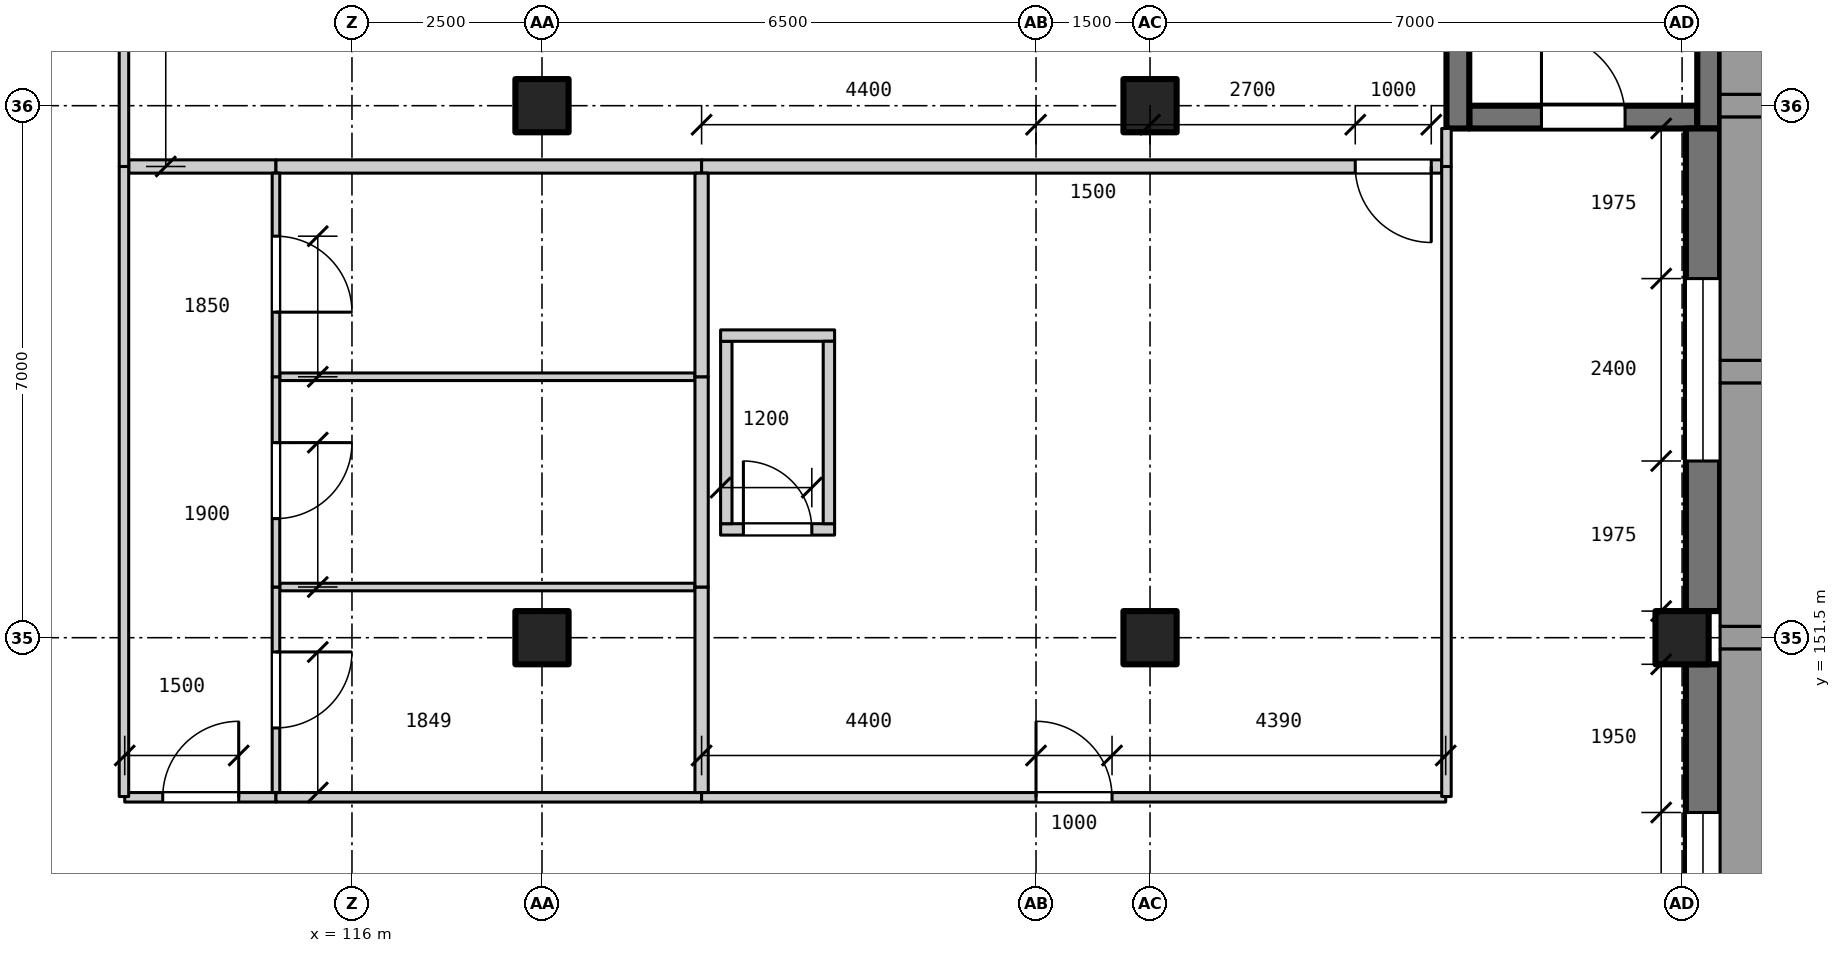
"""IFC4 building model, lengths in metres.
Left out: names, types, materials, properties, quantities, classifications, styles, units other than length and angle.
Written with IfcOpenShell. Run it as: python <this file> out.ifc"""

import sys

from ifc_helpers import new_model, si_unit, direction, frame, frame_2d, origin, origin_2d, place, context, subcontext, project, spatial, rectangle, extrude, element, fill, save


model = new_model("IFC4")
c1 = context("Model", 3, precision=1e-05, world=origin(), true_north=direction((0.0, 1.0)))
c2 = subcontext(c1, "Body", "Model", "MODEL_VIEW")
j1 = project(units=[si_unit("LENGTHUNIT", "METRE"), si_unit("PLANEANGLEUNIT", "RADIAN")], contexts=[c1])
p1 = place(None, origin())
s1 = spatial("IfcSite", under=j1, at=p1, CompositionType="ELEMENT")
p2 = place(p1, origin())
s2 = spatial("IfcBuilding", under=s1, at=p2, CompositionType="ELEMENT")
p3 = place(p2, frame((0.0, 0.0, 6.0)))
s3 = spatial("IfcBuildingStorey", under=s2, at=p3, CompositionType="ELEMENT", Elevation=6.0)
for number, where, z_axis, x_axis in (
    (1, (118.5, 151.5, 0.0), (0.0, 0.0, 1.0), (1.0, 0.0, 0.0)),
    (2, (118.5, 158.5, 0.0), (0.0, 0.0, 1.0), (1.0, 0.0, 0.0)),
    (3, (126.5, 151.5, 0.0), (0.0, 0.0, 1.0), (1.0, 0.0, 0.0)),
    (4, (126.5, 158.5, 0.0), (0.0, 0.0, 1.0), (1.0, 0.0, 0.0)),
    (5, (133.5, 151.5, 0.0), (0.0, 0.0, 1.0), (1.0, 0.0, 0.0)),
):
    element("IfcColumn", number, at=place(p3, frame(where, z_axis=z_axis, x_axis=x_axis)), inside=s3, PredefinedType="COLUMN", context=c2, shape_type="SweptSolid", body=[
        extrude(rectangle(XDim=0.7, YDim=0.7, at=origin_2d()), origin(), (0.0, 0.0, 1.0), 4.2),
    ])
p4 = place(p3, frame((130.7, 158.35, 0.0), z_axis=(0.0, 0.0, 1.0), x_axis=(1.0, 0.0, 0.0)))
e6 = element("IfcWall", 6, at=p4, inside=s3, PredefinedType="SHEAR", context=c2, shape_type="SweptSolid", body=[
    extrude(rectangle(XDim=3.0, YDim=0.3, at=frame_2d((1.5, 0.0))), origin(), (0.0, 0.0, 1.0), 4.2),
])
p5 = place(p4, frame((0.95, 0.0, 0.0)))
e7 = element("IfcOpeningElement", 7, at=p5, cuts=e6, PredefinedType="OPENING", context=c2, shape_type="SweptSolid", body=[
    extrude(rectangle(XDim=1.1, YDim=2.1, at=frame_2d((0.55, 1.05))), frame((0.0, 0.16, 0.0), z_axis=(0.0, -1.0, 0.0), x_axis=(1.0, 0.0, 0.0)), (0.0, 0.0, 1.0), 0.32),
])
p6 = place(p3, frame((130.55, 158.2, 0.0), z_axis=(0.0, 0.0, 1.0), x_axis=(0.0, 1.0, 0.0)))
e8 = element("IfcWall", 8, at=p6, inside=s3, PredefinedType="SHEAR", context=c2, shape_type="SweptSolid", body=[
    extrude(rectangle(XDim=7.5, YDim=0.3, at=frame_2d((3.75, 0.0))), origin(), (0.0, 0.0, 1.0), 4.2),
])
p7 = place(p3, frame((133.85, 165.7, 0.0), z_axis=(0.0, 0.0, 1.0), x_axis=(0.0, -1.0, 0.0)))
e9 = element("IfcWall", 9, at=p7, inside=s3, PredefinedType="SOLIDWALL", context=c2, shape_type="SweptSolid", body=[
    extrude(rectangle(XDim=7.5, YDim=0.3, at=frame_2d((3.75, 0.0))), origin(), (0.0, 0.0, 1.0), 3.9),
])
p8 = place(p3, frame((133.775, 151.15, 0.0), z_axis=(0.0, 0.0, 1.0), x_axis=(0.0, -1.0, 0.0)))
e10 = element("IfcWall", 10, at=p8, inside=s3, PredefinedType="SOLIDWALL", context=c2, shape_type="SweptSolid", body=[
    extrude(rectangle(XDim=6.3, YDim=0.45, at=frame_2d((3.15, 0.0))), origin(), (0.0, 0.0, 1.0), 3.2),
])
p9 = place(p8, frame((1.95, 0.0, 0.9)))
e11 = element("IfcOpeningElement", 11, at=p9, cuts=e10, PredefinedType="OPENING", context=c2, shape_type="SweptSolid", body=[
    extrude(rectangle(XDim=2.4, YDim=1.6, at=frame_2d((1.2, 0.8))), frame((0.0, 0.235, 0.0), z_axis=(0.0, -1.0, 0.0), x_axis=(1.0, 0.0, 0.0)), (0.0, 0.0, 1.0), 0.47),
])
p10 = place(p3, frame((133.775, 158.2, 0.0), z_axis=(0.0, 0.0, 1.0), x_axis=(0.0, -1.0, 0.0)))
e12 = element("IfcWall", 12, at=p10, inside=s3, PredefinedType="SOLIDWALL", context=c2, shape_type="SweptSolid", body=[
    extrude(rectangle(XDim=6.35, YDim=0.45, at=frame_2d((3.175, 0.0))), origin(), (0.0, 0.0, 1.0), 3.2),
])
p11 = place(p10, frame((1.975, 0.0, 0.9)))
e13 = element("IfcOpeningElement", 13, at=p11, cuts=e12, PredefinedType="OPENING", context=c2, shape_type="SweptSolid", body=[
    extrude(rectangle(XDim=2.4, YDim=1.6, at=frame_2d((1.2, 0.8))), frame((0.0, 0.235, 0.0), z_axis=(0.0, -1.0, 0.0), x_axis=(1.0, 0.0, 0.0)), (0.0, 0.0, 1.0), 0.47),
])
p12 = place(p3, frame((120.85, 152.925, 0.0), z_axis=(0.0, 0.0, 1.0), x_axis=(1.0, 0.0, 0.0)))
e14 = element("IfcWall", 14, at=p12, inside=s3, PredefinedType="PARTITIONING", context=c2, shape_type="SweptSolid", body=[
    extrude(rectangle(XDim=1.5, YDim=0.15, at=frame_2d((0.75, 0.0))), origin(), (0.0, 0.0, 1.0), 3.9),
])
p13 = place(p12, frame((0.3, 0.0, 0.0)))
e15 = element("IfcOpeningElement", 15, at=p13, cuts=e14, PredefinedType="OPENING", context=c2, shape_type="SweptSolid", body=[
    extrude(rectangle(XDim=0.9, YDim=2.1, at=frame_2d((0.45, 1.05))), frame((0.0, 0.085, 0.0), z_axis=(0.0, -1.0, 0.0), x_axis=(1.0, 0.0, 0.0)), (0.0, 0.0, 1.0), 0.17),
])
p14 = place(p3, frame((120.925, 153.0, 0.0), z_axis=(0.0, 0.0, 1.0), x_axis=(0.0, 1.0, 0.0)))
e16 = element("IfcWall", 16, at=p14, inside=s3, PredefinedType="PARTITIONING", context=c2, shape_type="SweptSolid", body=[
    extrude(rectangle(XDim=2.4, YDim=0.15, at=frame_2d((1.2, 0.0))), origin(), (0.0, 0.0, 1.0), 3.9),
])
p15 = place(p3, frame((120.85, 155.475, 0.0), z_axis=(0.0, 0.0, 1.0), x_axis=(1.0, 0.0, 0.0)))
e17 = element("IfcWall", 17, at=p15, inside=s3, PredefinedType="PARTITIONING", context=c2, shape_type="SweptSolid", body=[
    extrude(rectangle(XDim=1.5, YDim=0.15, at=frame_2d((0.75, 0.0))), origin(), (0.0, 0.0, 1.0), 3.9),
])
p16 = place(p3, frame((122.275, 153.0, 0.0), z_axis=(0.0, 0.0, 1.0), x_axis=(0.0, 1.0, 0.0)))
e18 = element("IfcWall", 18, at=p16, inside=s3, PredefinedType="PARTITIONING", context=c2, shape_type="SweptSolid", body=[
    extrude(rectangle(XDim=2.4, YDim=0.15, at=frame_2d((1.2, 0.0))), origin(), (0.0, 0.0, 1.0), 3.9),
])
p17 = place(p3, frame((113.01, 149.4, 0.0), z_axis=(0.0, 0.0, 1.0), x_axis=(1.0, 0.0, 0.0)))
e19 = element("IfcWall", 19, at=p17, inside=s3, PredefinedType="PARTITIONING", context=c2, shape_type="SweptSolid", body=[
    extrude(rectangle(XDim=1.99, YDim=0.125, at=frame_2d((0.995, 0.0))), origin(), (0.0, 0.0, 1.0), 3.9),
])
p18 = place(p17, frame((0.5, 0.0, 0.0)))
e20 = element("IfcOpeningElement", 20, at=p18, cuts=e19, PredefinedType="OPENING", context=c2, shape_type="SweptSolid", body=[
    extrude(rectangle(XDim=1.0, YDim=2.1, at=frame_2d((0.5, 1.05))), frame((0.0, 0.073, 0.0), z_axis=(0.0, -1.0, 0.0), x_axis=(1.0, 0.0, 0.0)), (0.0, 0.0, 1.0), 0.145),
])
p19 = place(p3, frame((115.0, 149.4, 0.0), z_axis=(0.0, 0.0, 1.0), x_axis=(1.0, 0.0, 0.0)))
e21 = element("IfcWall", 21, at=p19, inside=s3, PredefinedType="PARTITIONING", context=c2, shape_type="SweptSolid", body=[
    extrude(rectangle(XDim=5.6, YDim=0.125, at=frame_2d((2.8, 0.0))), origin(), (0.0, 0.0, 1.0), 3.9),
])
p20 = place(p3, frame((120.6, 149.4, 0.0), z_axis=(0.0, 0.0, 1.0), x_axis=(1.0, 0.0, 0.0)))
e22 = element("IfcWall", 22, at=p20, inside=s3, PredefinedType="PARTITIONING", context=c2, shape_type="SweptSolid", body=[
    extrude(rectangle(XDim=9.79, YDim=0.125, at=frame_2d((4.895, 0.0))), origin(), (0.0, 0.0, 1.0), 3.9),
])
p21 = place(p20, frame((4.4, 0.0, 0.0)))
e23 = element("IfcOpeningElement", 23, at=p21, cuts=e22, PredefinedType="OPENING", context=c2, shape_type="SweptSolid", body=[
    extrude(rectangle(XDim=1.0, YDim=2.1, at=frame_2d((0.5, 1.05))), frame((0.0, 0.073, 0.0), z_axis=(0.0, -1.0, 0.0), x_axis=(1.0, 0.0, 0.0)), (0.0, 0.0, 1.0), 0.145),
])
for number, where, z_axis, x_axis in (
    (24, (115.05, 152.167, 0.0), (0.0, 0.0, 1.0), (1.0, 0.0, 0.0)),
    (25, (115.05, 154.933, 0.0), (0.0, 0.0, 1.0), (1.0, 0.0, 0.0)),
):
    element("IfcWall", number, at=place(p3, frame(where, z_axis=z_axis, x_axis=x_axis)), inside=s3, PredefinedType="PARTITIONING", context=c2, shape_type="SweptSolid", body=[
        extrude(rectangle(XDim=5.462, YDim=0.1, at=frame_2d((2.731, 0.0))), origin(), (0.0, 0.0, 1.0), 3.9),
    ])
p22 = place(p3, frame((113.062, 157.7, 0.0), z_axis=(0.0, 0.0, 1.0), x_axis=(1.0, 0.0, 0.0)))
e26 = element("IfcWall", 26, at=p22, inside=s3, PredefinedType="PARTITIONING", context=c2, shape_type="SweptSolid", body=[
    extrude(rectangle(XDim=1.938, YDim=0.175, at=frame_2d((0.969, 0.0))), origin(), (0.0, 0.0, 1.0), 3.9),
])
p23 = place(p3, frame((115.0, 157.7, 0.0), z_axis=(0.0, 0.0, 1.0), x_axis=(1.0, 0.0, 0.0)))
e27 = element("IfcWall", 27, at=p23, inside=s3, PredefinedType="PARTITIONING", context=c2, shape_type="SweptSolid", body=[
    extrude(rectangle(XDim=5.6, YDim=0.175, at=frame_2d((2.8, 0.0))), origin(), (0.0, 0.0, 1.0), 3.9),
])
p24 = place(p3, frame((120.6, 157.7, 0.0), z_axis=(0.0, 0.0, 1.0), x_axis=(1.0, 0.0, 0.0)))
e28 = element("IfcWall", 28, at=p24, inside=s3, PredefinedType="PARTITIONING", context=c2, shape_type="SweptSolid", body=[
    extrude(rectangle(XDim=9.737, YDim=0.175, at=frame_2d((4.869, 0.0))), origin(), (0.0, 0.0, 1.0), 3.9),
])
p25 = place(p24, frame((8.6, 0.0, 0.0)))
e29 = element("IfcOpeningElement", 29, at=p25, cuts=e28, PredefinedType="OPENING", context=c2, shape_type="SweptSolid", body=[
    extrude(rectangle(XDim=1.0, YDim=2.1, at=frame_2d((0.5, 1.05))), frame((0.0, 0.097, 0.0), z_axis=(0.0, -1.0, 0.0), x_axis=(1.0, 0.0, 0.0)), (0.0, 0.0, 1.0), 0.195),
])
p26 = place(p3, frame((113.0, 149.41, 0.0), z_axis=(0.0, 0.0, 1.0), x_axis=(0.0, 1.0, 0.0)))
e30 = element("IfcWall", 30, at=p26, inside=s3, PredefinedType="PARTITIONING", context=c2, shape_type="SweptSolid", body=[
    extrude(rectangle(XDim=8.29, YDim=0.125, at=frame_2d((4.145, 0.0))), origin(), (0.0, 0.0, 1.0), 3.9),
])
p27 = place(p3, frame((113.0, 157.7, 0.0), z_axis=(0.0, 0.0, 1.0), x_axis=(0.0, 1.0, 0.0)))
e31 = element("IfcWall", 31, at=p27, inside=s3, PredefinedType="PARTITIONING", context=c2, shape_type="SweptSolid", body=[
    extrude(rectangle(XDim=8.15, YDim=0.125, at=frame_2d((4.075, 0.0))), origin(), (0.0, 0.0, 1.0), 3.9),
])
p28 = place(p27, frame((3.6, 0.0, 0.0)))
e32 = element("IfcOpeningElement", 32, at=p28, cuts=e31, PredefinedType="OPENING", context=c2, shape_type="SweptSolid", body=[
    extrude(rectangle(XDim=1.0, YDim=2.1, at=frame_2d((0.5, 1.05))), frame((0.0, 0.073, 0.0), z_axis=(0.0, -1.0, 0.0), x_axis=(1.0, 0.0, 0.0)), (0.0, 0.0, 1.0), 0.145),
])
p29 = place(p3, frame((115.0, 149.462, 0.0), z_axis=(0.0, 0.0, 1.0), x_axis=(0.0, 1.0, 0.0)))
e33 = element("IfcWall", 33, at=p29, inside=s3, PredefinedType="PARTITIONING", context=c2, shape_type="SweptSolid", body=[
    extrude(rectangle(XDim=2.704, YDim=0.1, at=frame_2d((1.352, 0.0))), origin(), (0.0, 0.0, 1.0), 3.9),
])
p30 = place(p29, frame((0.85, 0.0, 0.0)))
e34 = element("IfcOpeningElement", 34, at=p30, cuts=e33, PredefinedType="OPENING", context=c2, shape_type="SweptSolid", body=[
    extrude(rectangle(XDim=1.0, YDim=2.1, at=frame_2d((0.5, 1.05))), frame((0.0, 0.06, 0.0), z_axis=(0.0, -1.0, 0.0), x_axis=(1.0, 0.0, 0.0)), (0.0, 0.0, 1.0), 0.12),
])
p31 = place(p3, frame((115.0, 152.167, 0.0), z_axis=(0.0, 0.0, 1.0), x_axis=(0.0, 1.0, 0.0)))
e35 = element("IfcWall", 35, at=p31, inside=s3, PredefinedType="PARTITIONING", context=c2, shape_type="SweptSolid", body=[
    extrude(rectangle(XDim=2.767, YDim=0.1, at=frame_2d((1.383, 0.0))), origin(), (0.0, 0.0, 1.0), 3.9),
])
p32 = place(p31, frame((0.9, 0.0, 0.0)))
e36 = element("IfcOpeningElement", 36, at=p32, cuts=e35, PredefinedType="OPENING", context=c2, shape_type="SweptSolid", body=[
    extrude(rectangle(XDim=1.0, YDim=2.1, at=frame_2d((0.5, 1.05))), frame((0.0, 0.06, 0.0), z_axis=(0.0, -1.0, 0.0), x_axis=(1.0, 0.0, 0.0)), (0.0, 0.0, 1.0), 0.12),
])
p33 = place(p3, frame((115.0, 154.933, 0.0), z_axis=(0.0, 0.0, 1.0), x_axis=(0.0, 1.0, 0.0)))
e37 = element("IfcWall", 37, at=p33, inside=s3, PredefinedType="PARTITIONING", context=c2, shape_type="SweptSolid", body=[
    extrude(rectangle(XDim=2.679, YDim=0.1, at=frame_2d((1.34, 0.0))), origin(), (0.0, 0.0, 1.0), 3.9),
])
p34 = place(p33, frame((0.85, 0.0, 0.0)))
e38 = element("IfcOpeningElement", 38, at=p34, cuts=e37, PredefinedType="OPENING", context=c2, shape_type="SweptSolid", body=[
    extrude(rectangle(XDim=1.0, YDim=2.1, at=frame_2d((0.5, 1.05))), frame((0.0, 0.06, 0.0), z_axis=(0.0, -1.0, 0.0), x_axis=(1.0, 0.0, 0.0)), (0.0, 0.0, 1.0), 0.12),
])
p35 = place(p3, frame((120.6, 149.462, 0.0), z_axis=(0.0, 0.0, 1.0), x_axis=(0.0, 1.0, 0.0)))
e39 = element("IfcWall", 39, at=p35, inside=s3, PredefinedType="PARTITIONING", context=c2, shape_type="SweptSolid", body=[
    extrude(rectangle(XDim=2.704, YDim=0.175, at=frame_2d((1.352, 0.0))), origin(), (0.0, 0.0, 1.0), 3.9),
])
p36 = place(p3, frame((120.6, 152.167, 0.0), z_axis=(0.0, 0.0, 1.0), x_axis=(0.0, 1.0, 0.0)))
e40 = element("IfcWall", 40, at=p36, inside=s3, PredefinedType="PARTITIONING", context=c2, shape_type="SweptSolid", body=[
    extrude(rectangle(XDim=2.767, YDim=0.175, at=frame_2d((1.383, 0.0))), origin(), (0.0, 0.0, 1.0), 3.9),
])
p37 = place(p3, frame((120.6, 154.933, 0.0), z_axis=(0.0, 0.0, 1.0), x_axis=(0.0, 1.0, 0.0)))
e41 = element("IfcWall", 41, at=p37, inside=s3, PredefinedType="PARTITIONING", context=c2, shape_type="SweptSolid", body=[
    extrude(rectangle(XDim=2.679, YDim=0.175, at=frame_2d((1.34, 0.0))), origin(), (0.0, 0.0, 1.0), 3.9),
])
p38 = place(p3, frame((130.4, 149.41, 0.0), z_axis=(0.0, 0.0, 1.0), x_axis=(0.0, 1.0, 0.0)))
e42 = element("IfcWall", 42, at=p38, inside=s3, PredefinedType="PARTITIONING", context=c2, shape_type="SweptSolid", body=[
    extrude(rectangle(XDim=8.29, YDim=0.125, at=frame_2d((4.145, 0.0))), origin(), (0.0, 0.0, 1.0), 3.9),
])
p39 = place(p3, frame((130.4, 157.7, 0.0), z_axis=(0.0, 0.0, 1.0), x_axis=(0.0, 1.0, 0.0)))
e43 = element("IfcWall", 43, at=p39, inside=s3, PredefinedType="PARTITIONING", context=c2, shape_type="SweptSolid", body=[
    extrude(rectangle(XDim=0.5, YDim=0.125, at=frame_2d((0.25, 0.0))), origin(), (0.0, 0.0, 1.0), 3.9),
])
p40 = place(p9, origin())
e44 = element("IfcWindow", 44, at=p40, inside=s3, PartitioningType="SINGLE_PANEL", PredefinedType="WINDOW", context=c2, shape_type="SweptSolid", body=[
    extrude(rectangle(XDim=2.4, YDim=1.6, at=frame_2d((1.2, 0.8))), frame((0.0, -0.125, 0.0), z_axis=(0.0, -1.0, 0.0), x_axis=(1.0, 0.0, 0.0)), (0.0, 0.0, 1.0), 0.06),
])
fill(e11, e44)
p41 = place(p11, origin())
e45 = element("IfcWindow", 45, at=p41, inside=s3, PartitioningType="SINGLE_PANEL", PredefinedType="WINDOW", context=c2, shape_type="SweptSolid", body=[
    extrude(rectangle(XDim=2.4, YDim=1.6, at=frame_2d((1.2, 0.8))), frame((0.0, -0.125, 0.0), z_axis=(0.0, -1.0, 0.0), x_axis=(1.0, 0.0, 0.0)), (0.0, 0.0, 1.0), 0.06),
])
fill(e13, e45)
p42 = place(p18, origin())
e46 = element("IfcDoor", 46, at=p42, inside=s3, OperationType="SINGLE_SWING_RIGHT", PredefinedType="DOOR", context=c2, shape_type="SweptSolid", body=[
    extrude(rectangle(XDim=1.0, YDim=2.1, at=frame_2d((0.5, 1.05))), frame((0.0, 0.025, 0.0), z_axis=(0.0, -1.0, 0.0), x_axis=(1.0, 0.0, 0.0)), (0.0, 0.0, 1.0), 0.05),
])
fill(e20, e46)
p43 = place(p21, origin())
e47 = element("IfcDoor", 47, at=p43, inside=s3, OperationType="SINGLE_SWING_LEFT", PredefinedType="DOOR", context=c2, shape_type="SweptSolid", body=[
    extrude(rectangle(XDim=1.0, YDim=2.1, at=frame_2d((0.5, 1.05))), frame((0.0, 0.025, 0.0), z_axis=(0.0, -1.0, 0.0), x_axis=(1.0, 0.0, 0.0)), (0.0, 0.0, 1.0), 0.05),
])
fill(e23, e47)
p44 = place(p30, frame((1.0, 0.0, 0.0), z_axis=(0.0, 0.0, 1.0), x_axis=(-1.0, 0.0, 0.0)))
e48 = element("IfcDoor", 48, at=p44, inside=s3, OperationType="SINGLE_SWING_LEFT", PredefinedType="DOOR", context=c2, shape_type="SweptSolid", body=[
    extrude(rectangle(XDim=1.0, YDim=2.1, at=frame_2d((0.5, 1.05))), frame((0.0, 0.025, 0.0), z_axis=(0.0, -1.0, 0.0), x_axis=(1.0, 0.0, 0.0)), (0.0, 0.0, 1.0), 0.05),
])
fill(e34, e48)
p45 = place(p13, origin())
e49 = element("IfcDoor", 49, at=p45, inside=s3, OperationType="SINGLE_SWING_LEFT", PredefinedType="DOOR", context=c2, shape_type="SweptSolid", body=[
    extrude(rectangle(XDim=0.9, YDim=2.1, at=frame_2d((0.45, 1.05))), frame((0.0, 0.025, 0.0), z_axis=(0.0, -1.0, 0.0), x_axis=(1.0, 0.0, 0.0)), (0.0, 0.0, 1.0), 0.05),
])
fill(e15, e49)
p46 = place(p32, frame((1.0, 0.0, 0.0), z_axis=(0.0, 0.0, 1.0), x_axis=(-1.0, 0.0, 0.0)))
e50 = element("IfcDoor", 50, at=p46, inside=s3, OperationType="SINGLE_SWING_LEFT", PredefinedType="DOOR", context=c2, shape_type="SweptSolid", body=[
    extrude(rectangle(XDim=1.0, YDim=2.1, at=frame_2d((0.5, 1.05))), frame((0.0, 0.025, 0.0), z_axis=(0.0, -1.0, 0.0), x_axis=(1.0, 0.0, 0.0)), (0.0, 0.0, 1.0), 0.05),
])
fill(e36, e50)
p47 = place(p34, frame((1.0, 0.0, 0.0), z_axis=(0.0, 0.0, 1.0), x_axis=(-1.0, 0.0, 0.0)))
e51 = element("IfcDoor", 51, at=p47, inside=s3, OperationType="SINGLE_SWING_RIGHT", PredefinedType="DOOR", context=c2, shape_type="SweptSolid", body=[
    extrude(rectangle(XDim=1.0, YDim=2.1, at=frame_2d((0.5, 1.05))), frame((0.0, 0.025, 0.0), z_axis=(0.0, -1.0, 0.0), x_axis=(1.0, 0.0, 0.0)), (0.0, 0.0, 1.0), 0.05),
])
fill(e38, e51)
p48 = place(p25, frame((1.0, 0.0, 0.0), z_axis=(0.0, 0.0, 1.0), x_axis=(-1.0, 0.0, 0.0)))
e52 = element("IfcDoor", 52, at=p48, inside=s3, OperationType="SINGLE_SWING_LEFT", PredefinedType="DOOR", context=c2, shape_type="SweptSolid", body=[
    extrude(rectangle(XDim=1.0, YDim=2.1, at=frame_2d((0.5, 1.05))), frame((0.0, 0.025, 0.0), z_axis=(0.0, -1.0, 0.0), x_axis=(1.0, 0.0, 0.0)), (0.0, 0.0, 1.0), 0.05),
])
fill(e29, e52)
p49 = place(p5, origin())
e53 = element("IfcDoor", 53, at=p49, inside=s3, OperationType="SINGLE_SWING_LEFT", PredefinedType="DOOR", context=c2, shape_type="SweptSolid", body=[
    extrude(rectangle(XDim=1.1, YDim=2.1, at=frame_2d((0.55, 1.05))), frame((0.0, 0.025, 0.0), z_axis=(0.0, -1.0, 0.0), x_axis=(1.0, 0.0, 0.0)), (0.0, 0.0, 1.0), 0.05),
])
fill(e7, e53)
save(model, sys.argv[1])
